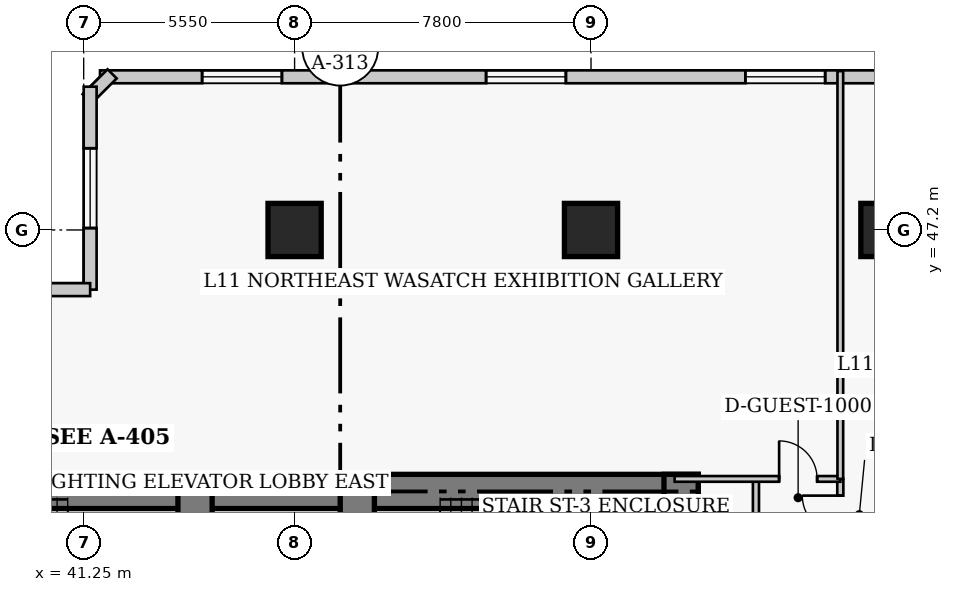
"""IFC4 building model, lengths in metres.
Left out: names, types, materials, properties, quantities, classifications, styles, units other than length and angle.
Written with IfcOpenShell. Run it as: python <this file> out.ifc"""

import sys

from ifc_helpers import new_model, si_unit, direction, frame, frame_2d, origin, origin_2d, place, context, subcontext, project, spatial, rectangle, extrude, element, fill, save


model = new_model("IFC4")
c1 = context("Model", 3, precision=1e-05, world=origin(), true_north=direction((0.0, 1.0)))
c2 = subcontext(c1, "Body", "Model", "MODEL_VIEW")
j1 = project(units=[si_unit("LENGTHUNIT", "METRE"), si_unit("PLANEANGLEUNIT", "RADIAN")], contexts=[c1])
p1 = place(None, origin())
s1 = spatial("IfcSite", under=j1, at=p1, CompositionType="ELEMENT")
p2 = place(p1, origin())
s2 = spatial("IfcBuilding", under=s1, at=p2, CompositionType="ELEMENT")
p3 = place(p2, frame((0.0, 0.0, 48.8)))
s3 = spatial("IfcBuildingStorey", under=s2, at=p3, CompositionType="ELEMENT", Elevation=48.8)
p4 = place(p3, frame((35.85, 40.32, 0.0), z_axis=(0.0, 0.0, 1.0), x_axis=(1.0, 0.0, 0.0)))
e1 = element("IfcWall", 1, at=p4, inside=s3, PredefinedType="SHEAR", context=c2, shape_type="SweptSolid", body=[
    extrude(rectangle(XDim=12.6, YDim=0.9, at=frame_2d((6.3, 0.0))), origin(), (0.0, 0.0, 1.0), 3.8),
])
p5 = place(p3, frame((48.45, 40.32, 0.0), z_axis=(0.0, 0.0, 1.0), x_axis=(1.0, 0.0, 0.0)))
e2 = element("IfcWall", 2, at=p5, inside=s3, PredefinedType="SHEAR", context=c2, shape_type="SweptSolid", body=[
    extrude(rectangle(XDim=8.97, YDim=0.9, at=frame_2d((4.485, 0.0))), origin(), (0.0, 0.0, 1.0), 3.8),
])
p6 = place(p3, frame((56.97, 27.05, 0.0), z_axis=(0.0, 0.0, 1.0), x_axis=(0.0, 1.0, 0.0)))
e3 = element("IfcWall", 3, at=p6, inside=s3, PredefinedType="SHEAR", context=c2, shape_type="SweptSolid", body=[
    extrude(rectangle(XDim=13.72, YDim=0.9, at=frame_2d((6.86, 0.0))), origin(), (0.0, 0.0, 1.0), 3.8),
])
p7 = place(p3, frame((44.18, 36.37, 0.0), z_axis=(0.0, 0.0, 1.0), x_axis=(0.0, 1.0, 0.0)))
e4 = element("IfcWall", 4, at=p7, inside=s3, PredefinedType="SHEAR", context=c2, shape_type="SweptSolid", body=[
    extrude(rectangle(XDim=3.95, YDim=0.9, at=frame_2d((1.975, 0.0))), origin(), (0.0, 0.0, 1.0), 3.8),
])
p8 = place(p3, frame((48.45, 32.3, 0.0), z_axis=(0.0, 0.0, 1.0), x_axis=(0.0, 1.0, 0.0)))
e5 = element("IfcWall", 5, at=p8, inside=s3, PredefinedType="SHEAR", context=c2, shape_type="SweptSolid", body=[
    extrude(rectangle(XDim=8.02, YDim=0.9, at=frame_2d((4.01, 0.0))), origin(), (0.0, 0.0, 1.0), 3.8),
])
p9 = place(p8, frame((5.9, 0.0, 0.0)))
e6 = element("IfcOpeningElement", 6, at=p9, cuts=e5, PredefinedType="OPENING", context=c2, shape_type="SweptSolid", body=[
    extrude(rectangle(XDim=1.1, YDim=2.15, at=frame_2d((0.55, 1.075))), frame((0.0, 0.46, 0.0), z_axis=(0.0, -1.0, 0.0), x_axis=(1.0, 0.0, 0.0)), (0.0, 0.0, 1.0), 0.92),
])
for number, where, z_axis, x_axis in (
    (7, (46.8, 47.2, 0.0), (0.0, 0.0, 1.0), (1.0, 0.0, 0.0)),
    (8, (54.6, 47.2, 0.0), (0.0, 0.0, 1.0), (1.0, 0.0, 0.0)),
    (9, (62.4, 47.2, 0.0), (0.0, 0.0, 1.0), (1.0, 0.0, 0.0)),
):
    element("IfcColumn", number, at=place(p3, frame(where, z_axis=z_axis, x_axis=x_axis)), inside=s3, PredefinedType="COLUMN", context=c2, shape_type="SweptSolid", body=[
        extrude(rectangle(XDim=1.4, YDim=1.4, at=origin_2d()), origin(), (0.0, 0.0, 1.0), 3.8),
    ])
p10 = place(p3, frame((71.57, 51.23, 0.0), z_axis=(0.0, 0.0, 1.0), x_axis=(-1.0, 0.0, 0.0)))
e10 = element("IfcWall", 10, at=p10, inside=s3, PredefinedType="SOLIDWALL", context=c2, shape_type="SweptSolid", body=[
    extrude(rectangle(XDim=29.89, YDim=0.34, at=frame_2d((14.945, 0.0))), origin(), (0.0, 0.0, 1.0), 3.54),
])
p11 = place(p10, frame((2.686, 0.0, 0.85)))
e11 = element("IfcOpeningElement", 11, at=p11, cuts=e10, PredefinedType="OPENING", context=c2, shape_type="SweptSolid", body=[
    extrude(rectangle(XDim=2.1, YDim=1.85, at=frame_2d((1.05, 0.925))), frame((0.0, 0.18, 0.0), z_axis=(0.0, -1.0, 0.0), x_axis=(1.0, 0.0, 0.0)), (0.0, 0.0, 1.0), 0.36),
])
p12 = place(p10, frame((10.809, 0.0, 0.85)))
e12 = element("IfcOpeningElement", 12, at=p12, cuts=e10, PredefinedType="OPENING", context=c2, shape_type="SweptSolid", body=[
    extrude(rectangle(XDim=2.1, YDim=1.85, at=frame_2d((1.05, 0.925))), frame((0.0, 0.18, 0.0), z_axis=(0.0, -1.0, 0.0), x_axis=(1.0, 0.0, 0.0)), (0.0, 0.0, 1.0), 0.36),
])
p13 = place(p10, frame((17.631, 0.0, 0.85)))
e13 = element("IfcOpeningElement", 13, at=p13, cuts=e10, PredefinedType="OPENING", context=c2, shape_type="SweptSolid", body=[
    extrude(rectangle(XDim=2.1, YDim=1.85, at=frame_2d((1.05, 0.925))), frame((0.0, 0.18, 0.0), z_axis=(0.0, -1.0, 0.0), x_axis=(1.0, 0.0, 0.0)), (0.0, 0.0, 1.0), 0.36),
])
p14 = place(p10, frame((25.104, 0.0, 0.85)))
e14 = element("IfcOpeningElement", 14, at=p14, cuts=e10, PredefinedType="OPENING", context=c2, shape_type="SweptSolid", body=[
    extrude(rectangle(XDim=2.1, YDim=1.85, at=frame_2d((1.05, 0.925))), frame((0.0, 0.18, 0.0), z_axis=(0.0, -1.0, 0.0), x_axis=(1.0, 0.0, 0.0)), (0.0, 0.0, 1.0), 0.36),
])
p15 = place(p3, frame((41.999, 51.308, 0.0), z_axis=(0.0, 0.0, 1.0), x_axis=(-0.707238225886, -0.706975312048, 0.0)))
e15 = element("IfcWall", 15, at=p15, inside=s3, PredefinedType="SOLIDWALL", context=c2, shape_type="SweptSolid", body=[
    extrude(rectangle(XDim=0.929, YDim=0.34, at=frame_2d((0.464, 0.0))), origin(), (0.0, 0.0, 1.0), 3.54),
])
p16 = place(p3, frame((41.42, 50.97, 0.0), z_axis=(0.0, 0.0, 1.0), x_axis=(0.0, -1.0, 0.0)))
e16 = element("IfcWall", 16, at=p16, inside=s3, PredefinedType="SOLIDWALL", context=c2, shape_type="SweptSolid", body=[
    extrude(rectangle(XDim=5.34, YDim=0.34, at=frame_2d((2.67, 0.0))), origin(), (0.0, 0.0, 1.0), 3.54),
])
p17 = place(p16, frame((1.62, 0.0, 0.85)))
e17 = element("IfcOpeningElement", 17, at=p17, cuts=e16, PredefinedType="OPENING", context=c2, shape_type="SweptSolid", body=[
    extrude(rectangle(XDim=2.1, YDim=1.85, at=frame_2d((1.05, 0.925))), frame((0.0, 0.18, 0.0), z_axis=(0.0, -1.0, 0.0), x_axis=(1.0, 0.0, 0.0)), (0.0, 0.0, 1.0), 0.36),
])
p18 = place(p3, frame((41.42, 45.63, 0.0), z_axis=(0.0, 0.0, 1.0), x_axis=(-1.0, 0.0, 0.0)))
e18 = element("IfcWall", 18, at=p18, inside=s3, PredefinedType="SOLIDWALL", context=c2, shape_type="SweptSolid", body=[
    extrude(rectangle(XDim=4.84, YDim=0.34, at=frame_2d((2.42, 0.0))), origin(), (0.0, 0.0, 1.0), 3.54),
])
p19 = place(p18, frame((1.37, 0.0, 0.85)))
e19 = element("IfcOpeningElement", 19, at=p19, cuts=e18, PredefinedType="OPENING", context=c2, shape_type="SweptSolid", body=[
    extrude(rectangle(XDim=2.1, YDim=1.85, at=frame_2d((1.05, 0.925))), frame((0.0, 0.18, 0.0), z_axis=(0.0, -1.0, 0.0), x_axis=(1.0, 0.0, 0.0)), (0.0, 0.0, 1.0), 0.36),
])
p20 = place(p3, frame((61.16, 10.25, 0.0), z_axis=(0.0, 0.0, 1.0), x_axis=(0.0, 1.0, 0.0)))
e20 = element("IfcWall", 20, at=p20, inside=s3, PredefinedType="PARTITIONING", context=c2, shape_type="SweptSolid", body=[
    extrude(rectangle(XDim=30.4, YDim=0.16, at=frame_2d((15.2, 0.0))), origin(), (0.0, 0.0, 1.0), 3.54),
])
p21 = place(p20, frame((4.4, 0.0, 0.0)))
e21 = element("IfcOpeningElement", 21, at=p21, cuts=e20, PredefinedType="OPENING", context=c2, shape_type="SweptSolid", body=[
    extrude(rectangle(XDim=0.95, YDim=2.1, at=frame_2d((0.475, 1.05))), frame((0.0, 0.09, 0.0), z_axis=(0.0, -1.0, 0.0), x_axis=(1.0, 0.0, 0.0)), (0.0, 0.0, 1.0), 0.18),
])
p22 = place(p20, frame((13.675, 0.0, 0.0)))
e22 = element("IfcOpeningElement", 22, at=p22, cuts=e20, PredefinedType="OPENING", context=c2, shape_type="SweptSolid", body=[
    extrude(rectangle(XDim=0.95, YDim=2.1, at=frame_2d((0.475, 1.05))), frame((0.0, 0.09, 0.0), z_axis=(0.0, -1.0, 0.0), x_axis=(1.0, 0.0, 0.0)), (0.0, 0.0, 1.0), 0.18),
])
p23 = place(p20, frame((21.8, 0.0, 0.0)))
e23 = element("IfcOpeningElement", 23, at=p23, cuts=e20, PredefinedType="OPENING", context=c2, shape_type="SweptSolid", body=[
    extrude(rectangle(XDim=0.95, YDim=2.1, at=frame_2d((0.475, 1.05))), frame((0.0, 0.09, 0.0), z_axis=(0.0, -1.0, 0.0), x_axis=(1.0, 0.0, 0.0)), (0.0, 0.0, 1.0), 0.18),
])
p24 = place(p20, frame((28.96, 0.0, 0.0)))
e24 = element("IfcOpeningElement", 24, at=p24, cuts=e20, PredefinedType="OPENING", context=c2, shape_type="SweptSolid", body=[
    extrude(rectangle(XDim=1.0, YDim=2.15, at=frame_2d((0.5, 1.075))), frame((0.0, 0.09, 0.0), z_axis=(0.0, -1.0, 0.0), x_axis=(1.0, 0.0, 0.0)), (0.0, 0.0, 1.0), 0.18),
])
p25 = place(p3, frame((58.94, 25.31, 0.0), z_axis=(0.0, 0.0, 1.0), x_axis=(0.0, 1.0, 0.0)))
e25 = element("IfcWall", 25, at=p25, inside=s3, PredefinedType="PARTITIONING", context=c2, shape_type="SweptSolid", body=[
    extrude(rectangle(XDim=15.34, YDim=0.16, at=frame_2d((7.67, 0.0))), origin(), (0.0, 0.0, 1.0), 3.54),
])
p26 = place(p3, frame((56.8, 40.65, 0.0), z_axis=(0.0, 0.0, 1.0), x_axis=(1.0, 0.0, 0.0)))
e26 = element("IfcWall", 26, at=p26, inside=s3, PredefinedType="PARTITIONING", context=c2, shape_type="SweptSolid", body=[
    extrude(rectangle(XDim=4.36, YDim=0.15, at=frame_2d((2.18, 0.0))), origin(), (0.0, 0.0, 1.0), 3.54),
])
p27 = place(p26, frame((2.75, 0.0, 0.0)))
e27 = element("IfcOpeningElement", 27, at=p27, cuts=e26, PredefinedType="OPENING", context=c2, shape_type="SweptSolid", body=[
    extrude(rectangle(XDim=1.0, YDim=2.15, at=frame_2d((0.5, 1.075))), frame((0.0, 0.085, 0.0), z_axis=(0.0, -1.0, 0.0), x_axis=(1.0, 0.0, 0.0)), (0.0, 0.0, 1.0), 0.17),
])
p28 = place(p3, frame((61.16, 40.65, 0.0), z_axis=(0.0, 0.0, 1.0), x_axis=(0.0, 1.0, 0.0)))
e28 = element("IfcWall", 28, at=p28, inside=s3, PredefinedType="PARTITIONING", context=c2, shape_type="SweptSolid", body=[
    extrude(rectangle(XDim=10.73, YDim=0.15, at=frame_2d((5.365, 0.0))), origin(), (0.0, 0.0, 1.0), 3.54),
])
p29 = place(p12, origin())
e29 = element("IfcWindow", 29, at=p29, inside=s3, PartitioningType="SINGLE_PANEL", PredefinedType="WINDOW", context=c2, shape_type="SweptSolid", body=[
    extrude(rectangle(XDim=2.1, YDim=1.85, at=frame_2d((1.05, 0.925))), frame((0.0, 0.03, 0.0), z_axis=(0.0, -1.0, 0.0), x_axis=(1.0, 0.0, 0.0)), (0.0, 0.0, 1.0), 0.06),
])
fill(e12, e29)
p30 = place(p13, origin())
e30 = element("IfcWindow", 30, at=p30, inside=s3, PartitioningType="SINGLE_PANEL", PredefinedType="WINDOW", context=c2, shape_type="SweptSolid", body=[
    extrude(rectangle(XDim=2.1, YDim=1.85, at=frame_2d((1.05, 0.925))), frame((0.0, 0.03, 0.0), z_axis=(0.0, -1.0, 0.0), x_axis=(1.0, 0.0, 0.0)), (0.0, 0.0, 1.0), 0.06),
])
fill(e13, e30)
p31 = place(p14, origin())
e31 = element("IfcWindow", 31, at=p31, inside=s3, PartitioningType="SINGLE_PANEL", PredefinedType="WINDOW", context=c2, shape_type="SweptSolid", body=[
    extrude(rectangle(XDim=2.1, YDim=1.85, at=frame_2d((1.05, 0.925))), frame((0.0, 0.03, 0.0), z_axis=(0.0, -1.0, 0.0), x_axis=(1.0, 0.0, 0.0)), (0.0, 0.0, 1.0), 0.06),
])
fill(e14, e31)
p32 = place(p17, origin())
e32 = element("IfcWindow", 32, at=p32, inside=s3, PartitioningType="SINGLE_PANEL", PredefinedType="WINDOW", context=c2, shape_type="SweptSolid", body=[
    extrude(rectangle(XDim=2.1, YDim=1.85, at=frame_2d((1.05, 0.925))), frame((0.0, 0.03, 0.0), z_axis=(0.0, -1.0, 0.0), x_axis=(1.0, 0.0, 0.0)), (0.0, 0.0, 1.0), 0.06),
])
fill(e17, e32)
p33 = place(p27, origin())
e33 = element("IfcDoor", 33, at=p33, inside=s3, OperationType="SINGLE_SWING_LEFT", PredefinedType="DOOR", context=c2, shape_type="SweptSolid", body=[
    extrude(rectangle(XDim=1.0, YDim=2.15, at=frame_2d((0.5, 1.075))), frame((0.0, 0.025, 0.0), z_axis=(0.0, -1.0, 0.0), x_axis=(1.0, 0.0, 0.0)), (0.0, 0.0, 1.0), 0.05),
])
fill(e27, e33)
p34 = place(p24, origin())
e34 = element("IfcDoor", 34, at=p34, inside=s3, OperationType="SINGLE_SWING_RIGHT", PredefinedType="DOOR", context=c2, shape_type="SweptSolid", body=[
    extrude(rectangle(XDim=1.0, YDim=2.15, at=frame_2d((0.5, 1.075))), frame((0.0, 0.025, 0.0), z_axis=(0.0, -1.0, 0.0), x_axis=(1.0, 0.0, 0.0)), (0.0, 0.0, 1.0), 0.05),
])
fill(e24, e34)
save(model, sys.argv[1])
